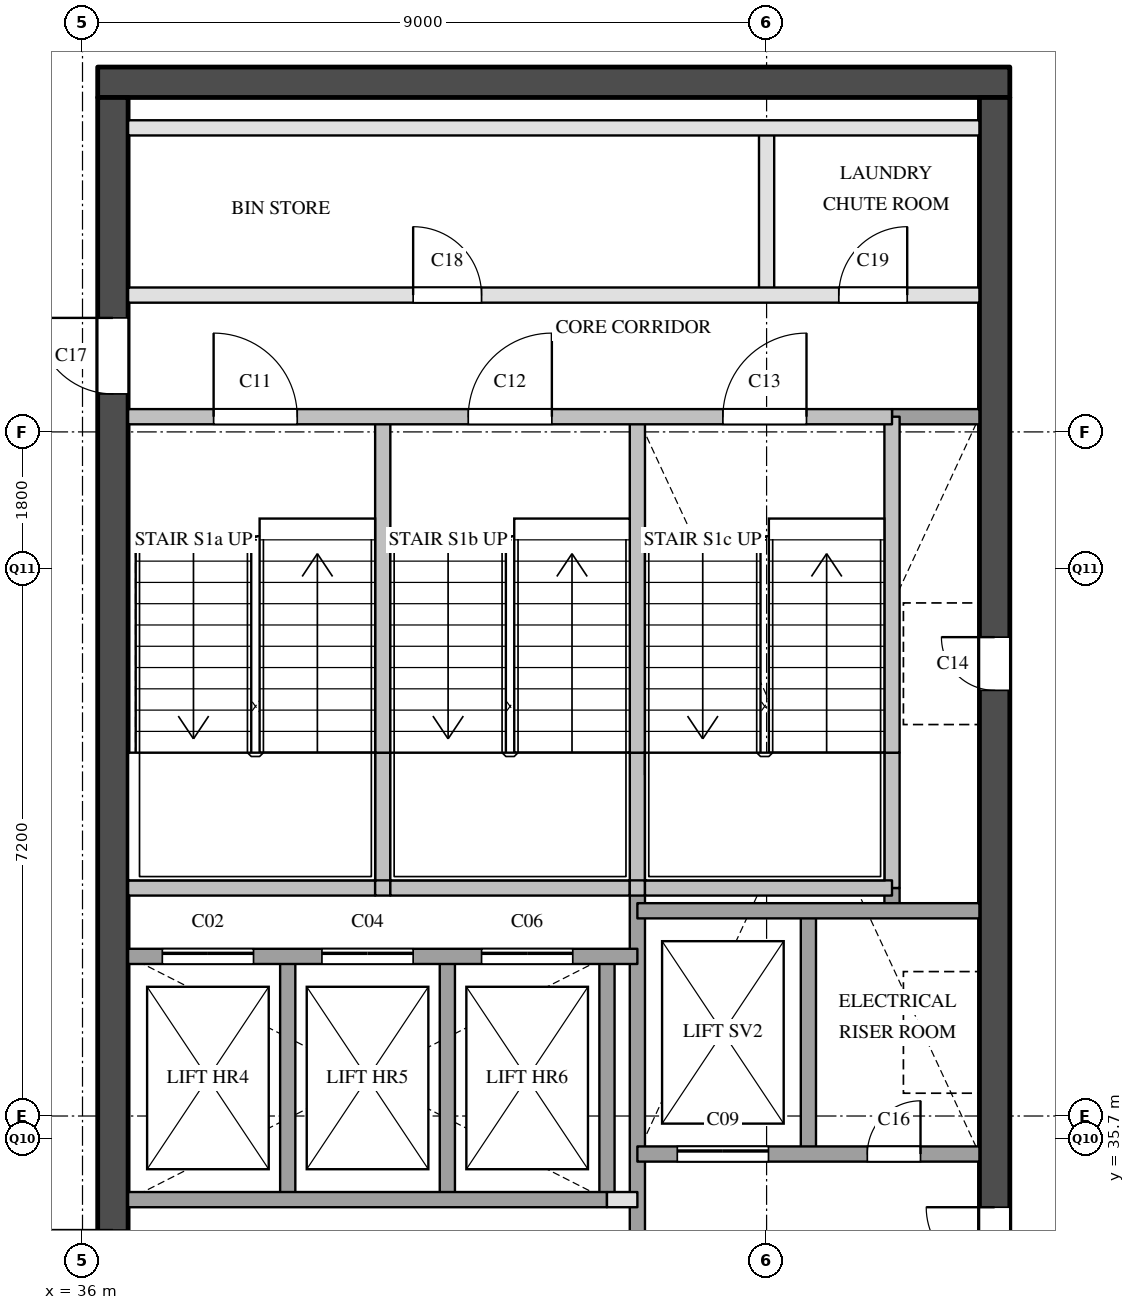
"""IFC4 building model, lengths in metres.
Left out: names, types, materials, properties, quantities, classifications, styles, units other than length and angle.
Written with IfcOpenShell. Run it as: python <this file> out.ifc"""

import sys

from ifc_helpers import new_model, si_unit, direction, frame, frame_2d, origin, place, context, subcontext, project, spatial, rectangle, extrude, element, fill, save


model = new_model("IFC4")
c1 = context("Model", 3, precision=1e-05, world=origin(), true_north=direction((0.0, 1.0)))
c2 = subcontext(c1, "Body", "Model", "MODEL_VIEW")
j1 = project(units=[si_unit("LENGTHUNIT", "METRE"), si_unit("PLANEANGLEUNIT", "RADIAN")], contexts=[c1])
p1 = place(None, origin())
s1 = spatial("IfcSite", under=j1, at=p1, CompositionType="ELEMENT")
p2 = place(p1, origin())
s2 = spatial("IfcBuilding", under=s1, at=p2, CompositionType="ELEMENT")
p3 = place(p2, frame((0.0, 0.0, 238.4)))
s3 = spatial("IfcBuildingStorey", under=s2, at=p3, CompositionType="ELEMENT", Elevation=238.4)
p4 = place(p3, frame((36.2, 49.6, 0.0), z_axis=(0.0, 0.0, 1.0), x_axis=(1.0, 0.0, 0.0)))
e1 = element("IfcWall", 1, at=p4, inside=s3, PredefinedType="SHEAR", context=c2, shape_type="SweptSolid", body=[
    extrude(rectangle(XDim=12.0, YDim=0.4, at=frame_2d((6.0, 0.0))), origin(), (0.0, 0.0, 1.0), 3.6),
])
p5 = place(p3, frame((36.4, 29.1, 0.0), z_axis=(0.0, 0.0, 1.0), x_axis=(0.0, 1.0, 0.0)))
e2 = element("IfcWall", 2, at=p5, inside=s3, PredefinedType="SHEAR", context=c2, shape_type="SweptSolid", body=[
    extrude(rectangle(XDim=20.3, YDim=0.4, at=frame_2d((10.15, 0.0))), origin(), (0.0, 0.0, 1.0), 3.6),
])
p6 = place(p5, frame((3.6, 0.0, 0.0)))
e3 = element("IfcOpeningElement", 3, at=p6, cuts=e2, PredefinedType="OPENING", context=c2, shape_type="SweptSolid", body=[
    extrude(rectangle(XDim=1.8, YDim=2.1, at=frame_2d((0.9, 1.05))), frame((0.0, 0.21, 0.0), z_axis=(0.0, -1.0, 0.0), x_axis=(1.0, 0.0, 0.0)), (0.0, 0.0, 1.0), 0.42),
])
p7 = place(p5, frame((16.4, 0.0, 0.0)))
e4 = element("IfcOpeningElement", 4, at=p7, cuts=e2, PredefinedType="OPENING", context=c2, shape_type="SweptSolid", body=[
    extrude(rectangle(XDim=1.0, YDim=2.1, at=frame_2d((0.5, 1.05))), frame((0.0, 0.21, 0.0), z_axis=(0.0, -1.0, 0.0), x_axis=(1.0, 0.0, 0.0)), (0.0, 0.0, 1.0), 0.42),
])
p8 = place(p3, frame((48.0, 29.1, 0.0), z_axis=(0.0, 0.0, 1.0), x_axis=(0.0, 1.0, 0.0)))
e5 = element("IfcWall", 5, at=p8, inside=s3, PredefinedType="SHEAR", context=c2, shape_type="SweptSolid", body=[
    extrude(rectangle(XDim=20.3, YDim=0.4, at=frame_2d((10.15, 0.0))), origin(), (0.0, 0.0, 1.0), 3.6),
])
p9 = place(p8, frame((12.5, 0.0, 0.0)))
e6 = element("IfcOpeningElement", 6, at=p9, cuts=e5, PredefinedType="OPENING", context=c2, shape_type="SweptSolid", body=[
    extrude(rectangle(XDim=0.7, YDim=2.1, at=frame_2d((0.35, 1.05))), frame((0.0, 0.21, 0.0), z_axis=(0.0, -1.0, 0.0), x_axis=(1.0, 0.0, 0.0)), (0.0, 0.0, 1.0), 0.42),
])
p10 = place(p8, frame((3.9, 0.0, 0.0)))
e7 = element("IfcOpeningElement", 7, at=p10, cuts=e5, PredefinedType="OPENING", context=c2, shape_type="SweptSolid", body=[
    extrude(rectangle(XDim=1.8, YDim=2.1, at=frame_2d((0.9, 1.05))), frame((0.0, 0.21, 0.0), z_axis=(0.0, -1.0, 0.0), x_axis=(1.0, 0.0, 0.0)), (0.0, 0.0, 1.0), 0.42),
])
p11 = place(p3, frame((38.7, 34.9, 0.0), z_axis=(0.0, 0.0, 1.0), x_axis=(0.0, 1.0, 0.0)))
e8 = element("IfcWall", 8, at=p11, inside=s3, PredefinedType="SOLIDWALL", context=c2, shape_type="SweptSolid", body=[
    extrude(rectangle(XDim=3.2, YDim=0.2, at=frame_2d((1.6, 0.0))), origin(), (0.0, 0.0, 1.0), 3.6),
])
p12 = place(p3, frame((39.95, 39.0, 0.0), z_axis=(0.0, 0.0, 1.0), x_axis=(0.0, 1.0, 0.0)))
e9 = element("IfcWall", 9, at=p12, inside=s3, PredefinedType="SOLIDWALL", context=c2, shape_type="SweptSolid", body=[
    extrude(rectangle(XDim=1.78, YDim=0.2, at=frame_2d((0.89, 0.0))), origin(), (0.0, 0.0, 1.0), 3.6),
])
p13 = place(p3, frame((39.95, 40.78, 0.0), z_axis=(0.0, 0.0, 1.0), x_axis=(0.0, 1.0, 0.0)))
e10 = element("IfcWall", 10, at=p13, inside=s3, PredefinedType="SOLIDWALL", context=c2, shape_type="SweptSolid", body=[
    extrude(rectangle(XDim=4.42, YDim=0.2, at=frame_2d((2.21, 0.0))), origin(), (0.0, 0.0, 1.0), 3.6),
])
for number, where, z_axis, x_axis in (
    (11, (40.8, 34.9, 0.0), (0.0, 0.0, 1.0), (0.0, 1.0, 0.0)),
    (12, (42.9, 34.9, 0.0), (0.0, 0.0, 1.0), (0.0, 1.0, 0.0)),
):
    element("IfcWall", number, at=place(p3, frame(where, z_axis=z_axis, x_axis=x_axis)), inside=s3, PredefinedType="SOLIDWALL", context=c2, shape_type="SweptSolid", body=[
        extrude(rectangle(XDim=3.2, YDim=0.2, at=frame_2d((1.6, 0.0))), origin(), (0.0, 0.0, 1.0), 3.6),
    ])
p14 = place(p3, frame((43.3, 29.1, 0.0), z_axis=(0.0, 0.0, 1.0), x_axis=(0.0, 1.0, 0.0)))
e13 = element("IfcWall", 13, at=p14, inside=s3, PredefinedType="SOLIDWALL", context=c2, shape_type="SweptSolid", body=[
    extrude(rectangle(XDim=9.9, YDim=0.2, at=frame_2d((4.95, 0.0))), origin(), (0.0, 0.0, 1.0), 3.6),
])
p15 = place(p3, frame((43.3, 39.0, 0.0), z_axis=(0.0, 0.0, 1.0), x_axis=(0.0, 1.0, 0.0)))
e14 = element("IfcWall", 14, at=p15, inside=s3, PredefinedType="SOLIDWALL", context=c2, shape_type="SweptSolid", body=[
    extrude(rectangle(XDim=1.78, YDim=0.2, at=frame_2d((0.89, 0.0))), origin(), (0.0, 0.0, 1.0), 3.6),
])
p16 = place(p3, frame((43.3, 40.78, 0.0), z_axis=(0.0, 0.0, 1.0), x_axis=(0.0, 1.0, 0.0)))
e15 = element("IfcWall", 15, at=p16, inside=s3, PredefinedType="SOLIDWALL", context=c2, shape_type="SweptSolid", body=[
    extrude(rectangle(XDim=4.42, YDim=0.2, at=frame_2d((2.21, 0.0))), origin(), (0.0, 0.0, 1.0), 3.6),
])
p17 = place(p3, frame((45.0, 46.8, 0.0), z_axis=(0.0, 0.0, 1.0), x_axis=(0.0, 1.0, 0.0)))
e16 = element("IfcWall", 16, at=p17, inside=s3, PredefinedType="PARTITIONING", context=c2, shape_type="SweptSolid", body=[
    extrude(rectangle(XDim=2.2, YDim=0.2, at=frame_2d((1.1, 0.0))), origin(), (0.0, 0.0, 1.0), 3.6),
])
p18 = place(p3, frame((45.55, 35.5, 0.0), z_axis=(0.0, 0.0, 1.0), x_axis=(0.0, 1.0, 0.0)))
e17 = element("IfcWall", 17, at=p18, inside=s3, PredefinedType="SOLIDWALL", context=c2, shape_type="SweptSolid", body=[
    extrude(rectangle(XDim=3.2, YDim=0.2, at=frame_2d((1.6, 0.0))), origin(), (0.0, 0.0, 1.0), 3.6),
])
p19 = place(p3, frame((46.65, 38.7, 0.0), z_axis=(0.0, 0.0, 1.0), x_axis=(0.0, 1.0, 0.0)))
e18 = element("IfcWall", 18, at=p19, inside=s3, PredefinedType="SOLIDWALL", context=c2, shape_type="SweptSolid", body=[
    extrude(rectangle(XDim=0.3, YDim=0.2, at=frame_2d((0.15, 0.0))), origin(), (0.0, 0.0, 1.0), 3.6),
])
p20 = place(p3, frame((46.65, 39.0, 0.0), z_axis=(0.0, 0.0, 1.0), x_axis=(0.0, 1.0, 0.0)))
e19 = element("IfcWall", 19, at=p20, inside=s3, PredefinedType="SOLIDWALL", context=c2, shape_type="SweptSolid", body=[
    extrude(rectangle(XDim=1.78, YDim=0.2, at=frame_2d((0.89, 0.0))), origin(), (0.0, 0.0, 1.0), 3.6),
])
p21 = place(p3, frame((46.65, 40.78, 0.0), z_axis=(0.0, 0.0, 1.0), x_axis=(0.0, 1.0, 0.0)))
e20 = element("IfcWall", 20, at=p21, inside=s3, PredefinedType="SOLIDWALL", context=c2, shape_type="SweptSolid", body=[
    extrude(rectangle(XDim=4.42, YDim=0.2, at=frame_2d((2.21, 0.0))), origin(), (0.0, 0.0, 1.0), 3.6),
])
p22 = place(p3, frame((42.9, 34.9, 0.0), z_axis=(0.0, 0.0, 1.0), x_axis=(1.0, 0.0, 0.0)))
e21 = element("IfcWall", 21, at=p22, inside=s3, PredefinedType="PARTITIONING", context=c2, shape_type="SweptSolid", body=[
    extrude(rectangle(XDim=0.4, YDim=0.2, at=frame_2d((0.2, 0.0))), origin(), (0.0, 0.0, 1.0), 3.6),
])
p23 = place(p3, frame((36.6, 34.9, 0.0), z_axis=(0.0, 0.0, 1.0), x_axis=(1.0, 0.0, 0.0)))
e22 = element("IfcWall", 22, at=p23, inside=s3, PredefinedType="SOLIDWALL", context=c2, shape_type="SweptSolid", body=[
    extrude(rectangle(XDim=6.3, YDim=0.2, at=frame_2d((3.15, 0.0))), origin(), (0.0, 0.0, 1.0), 3.6),
])
p24 = place(p3, frame((43.3, 35.5, 0.0), z_axis=(0.0, 0.0, 1.0), x_axis=(1.0, 0.0, 0.0)))
e23 = element("IfcWall", 23, at=p24, inside=s3, PredefinedType="SOLIDWALL", context=c2, shape_type="SweptSolid", body=[
    extrude(rectangle(XDim=4.5, YDim=0.2, at=frame_2d((2.25, 0.0))), origin(), (0.0, 0.0, 1.0), 3.6),
])
p25 = place(p24, frame((0.525, 0.0, 0.0)))
e24 = element("IfcOpeningElement", 24, at=p25, cuts=e23, PredefinedType="OPENING", context=c2, shape_type="SweptSolid", body=[
    extrude(rectangle(XDim=1.2, YDim=2.1, at=frame_2d((0.6, 1.05))), frame((0.0, 0.11, 0.0), z_axis=(0.0, -1.0, 0.0), x_axis=(1.0, 0.0, 0.0)), (0.0, 0.0, 1.0), 0.22),
])
p26 = place(p24, frame((3.025, 0.0, 0.0)))
e25 = element("IfcOpeningElement", 25, at=p26, cuts=e23, PredefinedType="OPENING", context=c2, shape_type="SweptSolid", body=[
    extrude(rectangle(XDim=0.7, YDim=2.1, at=frame_2d((0.35, 1.05))), frame((0.0, 0.11, 0.0), z_axis=(0.0, -1.0, 0.0), x_axis=(1.0, 0.0, 0.0)), (0.0, 0.0, 1.0), 0.22),
])
p27 = place(p3, frame((36.6, 38.1, 0.0), z_axis=(0.0, 0.0, 1.0), x_axis=(1.0, 0.0, 0.0)))
e26 = element("IfcWall", 26, at=p27, inside=s3, PredefinedType="SOLIDWALL", context=c2, shape_type="SweptSolid", body=[
    extrude(rectangle(XDim=6.7, YDim=0.2, at=frame_2d((3.35, 0.0))), origin(), (0.0, 0.0, 1.0), 3.6),
])
p28 = place(p27, frame((0.45, 0.0, 0.0)))
e27 = element("IfcOpeningElement", 27, at=p28, cuts=e26, PredefinedType="OPENING", context=c2, shape_type="SweptSolid", body=[
    extrude(rectangle(XDim=1.2, YDim=2.1, at=frame_2d((0.6, 1.05))), frame((0.0, 0.11, 0.0), z_axis=(0.0, -1.0, 0.0), x_axis=(1.0, 0.0, 0.0)), (0.0, 0.0, 1.0), 0.22),
])
p29 = place(p27, frame((2.55, 0.0, 0.0)))
e28 = element("IfcOpeningElement", 28, at=p29, cuts=e26, PredefinedType="OPENING", context=c2, shape_type="SweptSolid", body=[
    extrude(rectangle(XDim=1.2, YDim=2.1, at=frame_2d((0.6, 1.05))), frame((0.0, 0.11, 0.0), z_axis=(0.0, -1.0, 0.0), x_axis=(1.0, 0.0, 0.0)), (0.0, 0.0, 1.0), 0.22),
])
p30 = place(p27, frame((4.65, 0.0, 0.0)))
e29 = element("IfcOpeningElement", 29, at=p30, cuts=e26, PredefinedType="OPENING", context=c2, shape_type="SweptSolid", body=[
    extrude(rectangle(XDim=1.2, YDim=2.1, at=frame_2d((0.6, 1.05))), frame((0.0, 0.11, 0.0), z_axis=(0.0, -1.0, 0.0), x_axis=(1.0, 0.0, 0.0)), (0.0, 0.0, 1.0), 0.22),
])
p31 = place(p3, frame((43.3, 38.7, 0.0), z_axis=(0.0, 0.0, 1.0), x_axis=(1.0, 0.0, 0.0)))
e30 = element("IfcWall", 30, at=p31, inside=s3, PredefinedType="SOLIDWALL", context=c2, shape_type="SweptSolid", body=[
    extrude(rectangle(XDim=4.5, YDim=0.2, at=frame_2d((2.25, 0.0))), origin(), (0.0, 0.0, 1.0), 3.6),
])
p32 = place(p3, frame((36.6, 39.0, 0.0), z_axis=(0.0, 0.0, 1.0), x_axis=(1.0, 0.0, 0.0)))
e31 = element("IfcWall", 31, at=p32, inside=s3, PredefinedType="SOLIDWALL", context=c2, shape_type="SweptSolid", body=[
    extrude(rectangle(XDim=3.25, YDim=0.2, at=frame_2d((1.625, 0.0))), origin(), (0.0, 0.0, 1.0), 3.6),
])
p33 = place(p3, frame((39.85, 39.0, 0.0), z_axis=(0.0, 0.0, 1.0), x_axis=(1.0, 0.0, 0.0)))
e32 = element("IfcWall", 32, at=p33, inside=s3, PredefinedType="SOLIDWALL", context=c2, shape_type="SweptSolid", body=[
    extrude(rectangle(XDim=0.2, YDim=0.2, at=frame_2d((0.1, 0.0))), origin(), (0.0, 0.0, 1.0), 3.6),
])
p34 = place(p3, frame((40.05, 39.0, 0.0), z_axis=(0.0, 0.0, 1.0), x_axis=(1.0, 0.0, 0.0)))
e33 = element("IfcWall", 33, at=p34, inside=s3, PredefinedType="SOLIDWALL", context=c2, shape_type="SweptSolid", body=[
    extrude(rectangle(XDim=3.15, YDim=0.2, at=frame_2d((1.575, 0.0))), origin(), (0.0, 0.0, 1.0), 3.6),
])
p35 = place(p3, frame((43.2, 39.0, 0.0), z_axis=(0.0, 0.0, 1.0), x_axis=(1.0, 0.0, 0.0)))
e34 = element("IfcWall", 34, at=p35, inside=s3, PredefinedType="SOLIDWALL", context=c2, shape_type="SweptSolid", body=[
    extrude(rectangle(XDim=0.2, YDim=0.2, at=frame_2d((0.1, 0.0))), origin(), (0.0, 0.0, 1.0), 3.6),
])
p36 = place(p3, frame((43.4, 39.0, 0.0), z_axis=(0.0, 0.0, 1.0), x_axis=(1.0, 0.0, 0.0)))
e35 = element("IfcWall", 35, at=p36, inside=s3, PredefinedType="SOLIDWALL", context=c2, shape_type="SweptSolid", body=[
    extrude(rectangle(XDim=3.25, YDim=0.2, at=frame_2d((1.625, 0.0))), origin(), (0.0, 0.0, 1.0), 3.6),
])
p37 = place(p3, frame((46.65, 45.2, 0.0), z_axis=(0.0, 0.0, 1.0), x_axis=(1.0, 0.0, 0.0)))
e36 = element("IfcWall", 36, at=p37, inside=s3, PredefinedType="SOLIDWALL", context=c2, shape_type="SweptSolid", body=[
    extrude(rectangle(XDim=1.15, YDim=0.2, at=frame_2d((0.575, 0.0))), origin(), (0.0, 0.0, 1.0), 3.6),
])
p38 = place(p3, frame((36.6, 45.2, 0.0), z_axis=(0.0, 0.0, 1.0), x_axis=(1.0, 0.0, 0.0)))
e37 = element("IfcWall", 37, at=p38, inside=s3, PredefinedType="SOLIDWALL", context=c2, shape_type="SweptSolid", body=[
    extrude(rectangle(XDim=10.05, YDim=0.2, at=frame_2d((5.025, 0.0))), origin(), (0.0, 0.0, 1.0), 3.6),
])
p39 = place(p38, frame((1.125, 0.0, 0.0)))
e38 = element("IfcOpeningElement", 38, at=p39, cuts=e37, PredefinedType="OPENING", context=c2, shape_type="SweptSolid", body=[
    extrude(rectangle(XDim=1.1, YDim=2.1, at=frame_2d((0.55, 1.05))), frame((0.0, 0.11, 0.0), z_axis=(0.0, -1.0, 0.0), x_axis=(1.0, 0.0, 0.0)), (0.0, 0.0, 1.0), 0.22),
])
p40 = place(p38, frame((4.475, 0.0, 0.0)))
e39 = element("IfcOpeningElement", 39, at=p40, cuts=e37, PredefinedType="OPENING", context=c2, shape_type="SweptSolid", body=[
    extrude(rectangle(XDim=1.1, YDim=2.1, at=frame_2d((0.55, 1.05))), frame((0.0, 0.11, 0.0), z_axis=(0.0, -1.0, 0.0), x_axis=(1.0, 0.0, 0.0)), (0.0, 0.0, 1.0), 0.22),
])
p41 = place(p38, frame((7.825, 0.0, 0.0)))
e40 = element("IfcOpeningElement", 40, at=p41, cuts=e37, PredefinedType="OPENING", context=c2, shape_type="SweptSolid", body=[
    extrude(rectangle(XDim=1.1, YDim=2.1, at=frame_2d((0.55, 1.05))), frame((0.0, 0.11, 0.0), z_axis=(0.0, -1.0, 0.0), x_axis=(1.0, 0.0, 0.0)), (0.0, 0.0, 1.0), 0.22),
])
p42 = place(p3, frame((36.6, 46.8, 0.0), z_axis=(0.0, 0.0, 1.0), x_axis=(1.0, 0.0, 0.0)))
e41 = element("IfcWall", 41, at=p42, inside=s3, PredefinedType="PARTITIONING", context=c2, shape_type="SweptSolid", body=[
    extrude(rectangle(XDim=11.2, YDim=0.2, at=frame_2d((5.6, 0.0))), origin(), (0.0, 0.0, 1.0), 3.6),
])
p43 = place(p42, frame((3.75, 0.0, 0.0)))
e42 = element("IfcOpeningElement", 42, at=p43, cuts=e41, PredefinedType="OPENING", context=c2, shape_type="SweptSolid", body=[
    extrude(rectangle(XDim=0.9, YDim=2.1, at=frame_2d((0.45, 1.05))), frame((0.0, 0.11, 0.0), z_axis=(0.0, -1.0, 0.0), x_axis=(1.0, 0.0, 0.0)), (0.0, 0.0, 1.0), 0.22),
])
p44 = place(p42, frame((9.35, 0.0, 0.0)))
e43 = element("IfcOpeningElement", 43, at=p44, cuts=e41, PredefinedType="OPENING", context=c2, shape_type="SweptSolid", body=[
    extrude(rectangle(XDim=0.9, YDim=2.1, at=frame_2d((0.45, 1.05))), frame((0.0, 0.11, 0.0), z_axis=(0.0, -1.0, 0.0), x_axis=(1.0, 0.0, 0.0)), (0.0, 0.0, 1.0), 0.22),
])
p45 = place(p3, frame((36.6, 49.0, 0.0), z_axis=(0.0, 0.0, 1.0), x_axis=(1.0, 0.0, 0.0)))
e44 = element("IfcWall", 44, at=p45, inside=s3, PredefinedType="PARTITIONING", context=c2, shape_type="SweptSolid", body=[
    extrude(rectangle(XDim=11.2, YDim=0.2, at=frame_2d((5.6, 0.0))), origin(), (0.0, 0.0, 1.0), 3.6),
])
p46 = place(p28, origin())
e45 = element("IfcDoor", 45, at=p46, inside=s3, OperationType="SLIDING_TO_LEFT", PredefinedType="DOOR", context=c2, shape_type="SweptSolid", body=[
    extrude(rectangle(XDim=1.2, YDim=2.1, at=frame_2d((0.6, 1.05))), frame((0.0, 0.025, 0.0), z_axis=(0.0, -1.0, 0.0), x_axis=(1.0, 0.0, 0.0)), (0.0, 0.0, 1.0), 0.05),
])
fill(e27, e45)
p47 = place(p29, origin())
e46 = element("IfcDoor", 46, at=p47, inside=s3, OperationType="SLIDING_TO_LEFT", PredefinedType="DOOR", context=c2, shape_type="SweptSolid", body=[
    extrude(rectangle(XDim=1.2, YDim=2.1, at=frame_2d((0.6, 1.05))), frame((0.0, 0.025, 0.0), z_axis=(0.0, -1.0, 0.0), x_axis=(1.0, 0.0, 0.0)), (0.0, 0.0, 1.0), 0.05),
])
fill(e28, e46)
p48 = place(p30, origin())
e47 = element("IfcDoor", 47, at=p48, inside=s3, OperationType="SLIDING_TO_LEFT", PredefinedType="DOOR", context=c2, shape_type="SweptSolid", body=[
    extrude(rectangle(XDim=1.2, YDim=2.1, at=frame_2d((0.6, 1.05))), frame((0.0, 0.025, 0.0), z_axis=(0.0, -1.0, 0.0), x_axis=(1.0, 0.0, 0.0)), (0.0, 0.0, 1.0), 0.05),
])
fill(e29, e47)
p49 = place(p25, origin())
e48 = element("IfcDoor", 48, at=p49, inside=s3, OperationType="SLIDING_TO_LEFT", PredefinedType="DOOR", context=c2, shape_type="SweptSolid", body=[
    extrude(rectangle(XDim=1.2, YDim=2.1, at=frame_2d((0.6, 1.05))), frame((0.0, 0.025, 0.0), z_axis=(0.0, -1.0, 0.0), x_axis=(1.0, 0.0, 0.0)), (0.0, 0.0, 1.0), 0.05),
])
fill(e24, e48)
p50 = place(p6, origin())
e49 = element("IfcDoor", 49, at=p50, inside=s3, OperationType="DOUBLE_DOOR_SINGLE_SWING", PredefinedType="DOOR", context=c2, shape_type="SweptSolid", body=[
    extrude(rectangle(XDim=1.8, YDim=2.1, at=frame_2d((0.9, 1.05))), frame((0.0, 0.025, 0.0), z_axis=(0.0, -1.0, 0.0), x_axis=(1.0, 0.0, 0.0)), (0.0, 0.0, 1.0), 0.05),
])
fill(e3, e49)
p51 = place(p39, origin())
e50 = element("IfcDoor", 50, at=p51, inside=s3, OperationType="SINGLE_SWING_LEFT", PredefinedType="DOOR", context=c2, shape_type="SweptSolid", body=[
    extrude(rectangle(XDim=1.1, YDim=2.1, at=frame_2d((0.55, 1.05))), frame((0.0, 0.025, 0.0), z_axis=(0.0, -1.0, 0.0), x_axis=(1.0, 0.0, 0.0)), (0.0, 0.0, 1.0), 0.05),
])
fill(e38, e50)
p52 = place(p40, origin())
e51 = element("IfcDoor", 51, at=p52, inside=s3, OperationType="SINGLE_SWING_RIGHT", PredefinedType="DOOR", context=c2, shape_type="SweptSolid", body=[
    extrude(rectangle(XDim=1.1, YDim=2.1, at=frame_2d((0.55, 1.05))), frame((0.0, 0.025, 0.0), z_axis=(0.0, -1.0, 0.0), x_axis=(1.0, 0.0, 0.0)), (0.0, 0.0, 1.0), 0.05),
])
fill(e39, e51)
p53 = place(p41, origin())
e52 = element("IfcDoor", 52, at=p53, inside=s3, OperationType="SINGLE_SWING_RIGHT", PredefinedType="DOOR", context=c2, shape_type="SweptSolid", body=[
    extrude(rectangle(XDim=1.1, YDim=2.1, at=frame_2d((0.55, 1.05))), frame((0.0, 0.025, 0.0), z_axis=(0.0, -1.0, 0.0), x_axis=(1.0, 0.0, 0.0)), (0.0, 0.0, 1.0), 0.05),
])
fill(e40, e52)
p54 = place(p9, origin())
e53 = element("IfcDoor", 53, at=p54, inside=s3, OperationType="SINGLE_SWING_RIGHT", PredefinedType="DOOR", context=c2, shape_type="SweptSolid", body=[
    extrude(rectangle(XDim=0.7, YDim=2.1, at=frame_2d((0.35, 1.05))), frame((0.0, 0.025, 0.0), z_axis=(0.0, -1.0, 0.0), x_axis=(1.0, 0.0, 0.0)), (0.0, 0.0, 1.0), 0.05),
])
fill(e6, e53)
p55 = place(p10, origin())
e54 = element("IfcDoor", 54, at=p55, inside=s3, OperationType="DOUBLE_DOOR_SINGLE_SWING", PredefinedType="DOOR", context=c2, shape_type="SweptSolid", body=[
    extrude(rectangle(XDim=1.8, YDim=2.1, at=frame_2d((0.9, 1.05))), frame((0.0, 0.025, 0.0), z_axis=(0.0, -1.0, 0.0), x_axis=(1.0, 0.0, 0.0)), (0.0, 0.0, 1.0), 0.05),
])
fill(e7, e54)
p56 = place(p26, origin())
e55 = element("IfcDoor", 55, at=p56, inside=s3, OperationType="SINGLE_SWING_RIGHT", PredefinedType="DOOR", context=c2, shape_type="SweptSolid", body=[
    extrude(rectangle(XDim=0.7, YDim=2.1, at=frame_2d((0.35, 1.05))), frame((0.0, 0.025, 0.0), z_axis=(0.0, -1.0, 0.0), x_axis=(1.0, 0.0, 0.0)), (0.0, 0.0, 1.0), 0.05),
])
fill(e25, e55)
p57 = place(p7, origin())
e56 = element("IfcDoor", 56, at=p57, inside=s3, OperationType="SINGLE_SWING_RIGHT", PredefinedType="DOOR", context=c2, shape_type="SweptSolid", body=[
    extrude(rectangle(XDim=1.0, YDim=2.1, at=frame_2d((0.5, 1.05))), frame((0.0, 0.025, 0.0), z_axis=(0.0, -1.0, 0.0), x_axis=(1.0, 0.0, 0.0)), (0.0, 0.0, 1.0), 0.05),
])
fill(e4, e56)
p58 = place(p43, origin())
e57 = element("IfcDoor", 57, at=p58, inside=s3, OperationType="SINGLE_SWING_LEFT", PredefinedType="DOOR", context=c2, shape_type="SweptSolid", body=[
    extrude(rectangle(XDim=0.9, YDim=2.1, at=frame_2d((0.45, 1.05))), frame((0.0, 0.025, 0.0), z_axis=(0.0, -1.0, 0.0), x_axis=(1.0, 0.0, 0.0)), (0.0, 0.0, 1.0), 0.05),
])
fill(e42, e57)
p59 = place(p44, origin())
e58 = element("IfcDoor", 58, at=p59, inside=s3, OperationType="SINGLE_SWING_RIGHT", PredefinedType="DOOR", context=c2, shape_type="SweptSolid", body=[
    extrude(rectangle(XDim=0.9, YDim=2.1, at=frame_2d((0.45, 1.05))), frame((0.0, 0.025, 0.0), z_axis=(0.0, -1.0, 0.0), x_axis=(1.0, 0.0, 0.0)), (0.0, 0.0, 1.0), 0.05),
])
fill(e43, e58)
save(model, sys.argv[1])
